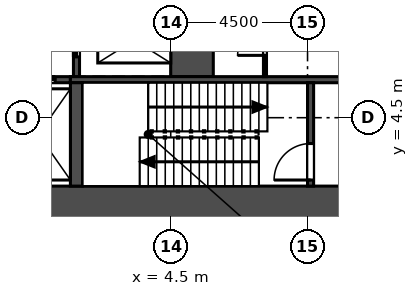
"""IFC4 building model, lengths in metres.
Left out: names, types, materials, properties, quantities, classifications, styles, units other than length and angle.
Written with IfcOpenShell. Run it as: python <this file> out.ifc"""

import sys

from ifc_helpers import new_model, si_unit, direction, frame, frame_2d, origin, place, context, subcontext, project, spatial, rectangle, extrude, element, fill, save


model = new_model("IFC4")
c1 = context("Model", 3, precision=1e-05, world=origin(), true_north=direction((0.0, 1.0)))
c2 = subcontext(c1, "Body", "Model", "MODEL_VIEW")
j1 = project(units=[si_unit("LENGTHUNIT", "METRE"), si_unit("PLANEANGLEUNIT", "RADIAN")], contexts=[c1])
p1 = place(None, origin())
s1 = spatial("IfcSite", under=j1, at=p1, CompositionType="ELEMENT")
p2 = place(p1, origin())
s2 = spatial("IfcBuilding", under=s1, at=p2, CompositionType="ELEMENT")
p3 = place(p2, frame((0.0, 0.0, 25.0)))
s3 = spatial("IfcBuildingStorey", under=s2, at=p3, CompositionType="ELEMENT", Elevation=25.0)
p4 = place(p3, frame((-14.0, 1.55, 0.0), z_axis=(0.0, 0.0, 1.0), x_axis=(1.0, 0.0, 0.0)))
e1 = element("IfcWall", 1, at=p4, inside=s3, PredefinedType="SHEAR", context=c2, shape_type="SweptSolid", body=[
    extrude(rectangle(XDim=28.0, YDim=1.4, at=frame_2d((14.0, 0.0))), origin(), (0.0, 0.0, 1.0), 4.5),
])
p5 = place(p3, frame((1.4, 5.85, -2.0), z_axis=(0.0, 0.0, 1.0), x_axis=(0.0, 1.0, 0.0)))
e2 = element("IfcWall", 2, at=p5, inside=s3, PredefinedType="SOLIDWALL", context=c2, shape_type="SweptSolid", body=[
    extrude(rectangle(XDim=11.75, YDim=0.2, at=frame_2d((5.875, 0.0))), origin(), (0.0, 0.0, 1.0), 6.2),
])
p6 = place(p5, frame((0.65, 0.0, 2.0)))
e3 = element("IfcOpeningElement", 3, at=p6, cuts=e2, PredefinedType="OPENING", context=c2, shape_type="SweptSolid", body=[
    extrude(rectangle(XDim=1.1, YDim=2.1, at=frame_2d((0.55, 1.05))), frame((0.0, 0.11, 0.0), z_axis=(0.0, -1.0, 0.0), x_axis=(1.0, 0.0, 0.0)), (0.0, 0.0, 1.0), 0.22),
])
p7 = place(p5, frame((3.3, 0.0, 2.0)))
e4 = element("IfcOpeningElement", 4, at=p7, cuts=e2, PredefinedType="OPENING", context=c2, shape_type="SweptSolid", body=[
    extrude(rectangle(XDim=1.0, YDim=2.1, at=frame_2d((0.5, 1.05))), frame((0.0, 0.11, 0.0), z_axis=(0.0, -1.0, 0.0), x_axis=(1.0, 0.0, 0.0)), (0.0, 0.0, 1.0), 0.22),
])
p8 = place(p3, frame((5.2, 5.85, -2.0), z_axis=(0.0, 0.0, 1.0), x_axis=(0.0, 1.0, 0.0)))
e5 = element("IfcWall", 5, at=p8, inside=s3, PredefinedType="SOLIDWALL", context=c2, shape_type="SweptSolid", body=[
    extrude(rectangle(XDim=2.4, YDim=1.4, at=frame_2d((1.2, 0.0))), origin(), (0.0, 0.0, 1.0), 6.2),
])
p9 = place(p3, frame((-1.2, 5.75, -2.0), z_axis=(0.0, 0.0, 1.0), x_axis=(1.0, 0.0, 0.0)))
e6 = element("IfcWall", 6, at=p9, inside=s3, PredefinedType="SOLIDWALL", context=c2, shape_type="SweptSolid", body=[
    extrude(rectangle(XDim=2.4, YDim=0.2, at=frame_2d((1.2, 0.0))), origin(), (0.0, 0.0, 1.0), 6.2),
])
p10 = place(p9, frame((0.5, 0.0, 2.0)))
e7 = element("IfcOpeningElement", 7, at=p10, cuts=e6, PredefinedType="OPENING", context=c2, shape_type="SweptSolid", body=[
    extrude(rectangle(XDim=1.4, YDim=2.1, at=frame_2d((0.7, 1.05))), frame((0.0, 0.11, 0.0), z_axis=(0.0, -1.0, 0.0), x_axis=(1.0, 0.0, 0.0)), (0.0, 0.0, 1.0), 0.22),
])
p11 = place(p3, frame((1.2, 5.75, -2.0), z_axis=(0.0, 0.0, 1.0), x_axis=(1.0, 0.0, 0.0)))
e8 = element("IfcWall", 8, at=p11, inside=s3, PredefinedType="SOLIDWALL", context=c2, shape_type="SweptSolid", body=[
    extrude(rectangle(XDim=11.4, YDim=0.2, at=frame_2d((5.7, 0.0))), origin(), (0.0, 0.0, 1.0), 6.2),
])
p12 = place(p3, frame((9.1, 2.25, -2.0), z_axis=(0.0, 0.0, 1.0), x_axis=(0.0, 1.0, 0.0)))
e9 = element("IfcWall", 9, at=p12, inside=s3, PredefinedType="SOLIDWALL", context=c2, shape_type="SweptSolid", body=[
    extrude(rectangle(XDim=3.4, YDim=0.2, at=frame_2d((1.7, 0.0))), origin(), (0.0, 0.0, 1.0), 6.2),
])
p13 = place(p12, frame((0.2, 0.0, 2.0)))
e10 = element("IfcOpeningElement", 10, at=p13, cuts=e9, PredefinedType="OPENING", context=c2, shape_type="SweptSolid", body=[
    extrude(rectangle(XDim=1.2, YDim=2.1, at=frame_2d((0.6, 1.05))), frame((0.0, 0.11, 0.0), z_axis=(0.0, -1.0, 0.0), x_axis=(1.0, 0.0, 0.0)), (0.0, 0.0, 1.0), 0.22),
])
p14 = place(p3, frame((1.4, 2.25, -2.0), z_axis=(0.0, 0.0, 1.0), x_axis=(0.0, 1.0, 0.0)))
e11 = element("IfcWall", 11, at=p14, inside=s3, PredefinedType="SOLIDWALL", context=c2, shape_type="SweptSolid", body=[
    extrude(rectangle(XDim=3.4, YDim=0.4, at=frame_2d((1.7, 0.0))), origin(), (0.0, 0.0, 1.0), 6.2),
])
p15 = place(p3, frame((7.6, 5.85, 0.0), z_axis=(0.0, 0.0, 1.0), x_axis=(0.0, 1.0, 0.0)))
e12 = element("IfcWall", 12, at=p15, inside=s3, PredefinedType="PARTITIONING", context=c2, shape_type="SweptSolid", body=[
    extrude(rectangle(XDim=2.4, YDim=0.1, at=frame_2d((1.2, 0.0))), origin(), (0.0, 0.0, 1.0), 4.2),
])
p16 = place(p15, frame((0.7, 0.0, 0.0)))
e13 = element("IfcOpeningElement", 13, at=p16, cuts=e12, PredefinedType="OPENING", context=c2, shape_type="SweptSolid", body=[
    extrude(rectangle(XDim=0.9, YDim=2.1, at=frame_2d((0.45, 1.05))), frame((0.0, 0.06, 0.0), z_axis=(0.0, -1.0, 0.0), x_axis=(1.0, 0.0, 0.0)), (0.0, 0.0, 1.0), 0.12),
])
p17 = place(p6, origin())
e14 = element("IfcDoor", 14, at=p17, inside=s3, OperationType="SLIDING_TO_RIGHT", PredefinedType="DOOR", context=c2, shape_type="SweptSolid", body=[
    extrude(rectangle(XDim=1.1, YDim=2.1, at=frame_2d((0.55, 1.05))), frame((0.0, 0.025, 0.0), z_axis=(0.0, -1.0, 0.0), x_axis=(1.0, 0.0, 0.0)), (0.0, 0.0, 1.0), 0.05),
])
fill(e3, e14)
p18 = place(p10, origin())
e15 = element("IfcDoor", 15, at=p18, inside=s3, OperationType="SLIDING_TO_LEFT", PredefinedType="DOOR", context=c2, shape_type="SweptSolid", body=[
    extrude(rectangle(XDim=1.4, YDim=2.1, at=frame_2d((0.7, 1.05))), frame((0.0, 0.025, 0.0), z_axis=(0.0, -1.0, 0.0), x_axis=(1.0, 0.0, 0.0)), (0.0, 0.0, 1.0), 0.05),
])
fill(e7, e15)
p19 = place(p16, origin())
e16 = element("IfcDoor", 16, at=p19, inside=s3, OperationType="SINGLE_SWING_LEFT", PredefinedType="DOOR", context=c2, shape_type="SweptSolid", body=[
    extrude(rectangle(XDim=0.9, YDim=2.1, at=frame_2d((0.45, 1.05))), frame((0.0, 0.025, 0.0), z_axis=(0.0, -1.0, 0.0), x_axis=(1.0, 0.0, 0.0)), (0.0, 0.0, 1.0), 0.05),
])
fill(e13, e16)
p20 = place(p13, origin())
e17 = element("IfcDoor", 17, at=p20, inside=s3, OperationType="SINGLE_SWING_LEFT", PredefinedType="DOOR", context=c2, shape_type="SweptSolid", body=[
    extrude(rectangle(XDim=1.2, YDim=2.1, at=frame_2d((0.6, 1.05))), frame((0.0, 0.025, 0.0), z_axis=(0.0, -1.0, 0.0), x_axis=(1.0, 0.0, 0.0)), (0.0, 0.0, 1.0), 0.05),
])
fill(e10, e17)
save(model, sys.argv[1])
